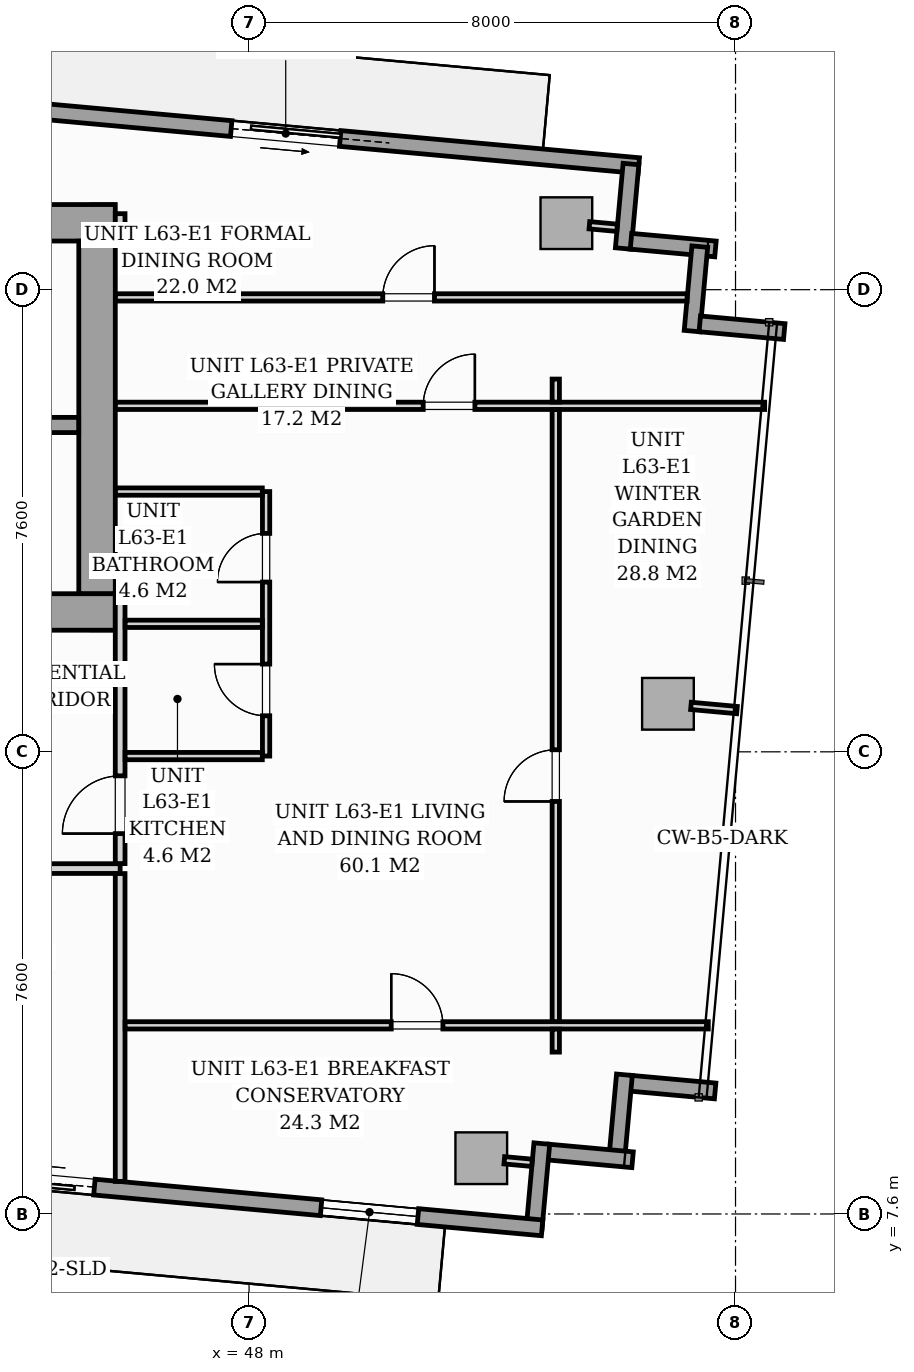
"""IFC4 building model, lengths in metres.
Left out: names, types, materials, properties, quantities, classifications, styles, units other than length and angle.
Written with IfcOpenShell. Run it as: python <this file> out.ifc"""

import sys

from ifc_helpers import new_model, si_unit, direction, frame, frame_2d, origin, origin_2d, place, context, subcontext, project, spatial, rectangle, i_section, extrude, source, transform, mapped, element, fill, save


model = new_model("IFC4")
c1 = context("Model", 3, precision=1e-05, world=origin(), true_north=direction((0.0, 1.0)))
c2 = subcontext(c1, "Body", "Model", "MODEL_VIEW")
j1 = project(units=[si_unit("LENGTHUNIT", "METRE"), si_unit("PLANEANGLEUNIT", "RADIAN")], contexts=[c1])
p1 = place(None, origin())
s1 = spatial("IfcSite", under=j1, at=p1, CompositionType="ELEMENT")
p2 = place(p1, origin())
s2 = spatial("IfcBuilding", under=s1, at=p2, CompositionType="ELEMENT")
p3 = place(p2, frame((0.0, 0.0, 219.9)))
s3 = spatial("IfcBuildingStorey", under=s2, at=p3, CompositionType="ELEMENT", Elevation=219.9)
m1 = source(origin(), c2, "Body", "SweptSolid", [
    extrude(i_section(OverallWidth=0.409, OverallDepth=0.425, WebThickness=0.033, FlangeThickness=0.052, FilletRadius=0.018, at=origin_2d()), origin(), (0.0, 0.0, 1.0), 3.296),
])
for number, where, z_axis, x_axis in (
    (1, (45.6, 17.4, 0.002), (0.0, 0.0, 1.0), (1.0, 0.0, 0.0)),
    (2, (45.6, 24.0, 0.002), (0.0, 0.0, 1.0), (1.0, 0.0, 0.0)),
):
    element("IfcColumn", number, at=place(p3, frame(where, z_axis=z_axis, x_axis=x_axis)), inside=s3, PredefinedType="PILASTER", context=c2, shape_type="MappedRepresentation", body=[
        mapped(m1, transform((0.0, 0.0, 0.0), scale=1.0)),
    ])
m2 = source(origin(), c2, "Body", "SweptSolid", [
    extrude(rectangle(XDim=0.85, YDim=0.85, at=origin_2d()), origin(), (0.0, 0.0, 1.0), 3.296),
])
for number, where, z_axis, x_axis in (
    (3, (51.819, 8.517, 0.002), (0.0, 0.0, 1.0), (0.996, -0.091, 0.0)),
    (4, (53.218, 23.894, 0.002), (0.0, 0.0, 1.0), (0.996, -0.091, 0.0)),
    (5, (54.889, 15.99, 0.002), (0.0, 0.0, 1.0), (0.996, -0.091, 0.0)),
):
    element("IfcColumn", number, at=place(p3, frame(where, z_axis=z_axis, x_axis=x_axis)), inside=s3, PredefinedType="COLUMN", context=c2, shape_type="MappedRepresentation", body=[
        mapped(m2, transform((0.0, 0.0, 0.0), scale=1.0)),
    ])
p4 = place(p3, frame((39.839, 26.166, 0.0), z_axis=(0.0, 0.0, 1.0), x_axis=(0.995884447498, -0.090632043071, 0.0)))
e6 = element("IfcWall", 6, at=p4, inside=s3, PredefinedType="STANDARD", context=c2, shape_type="SweptSolid", body=[
    extrude(rectangle(XDim=14.63, YDim=0.26, at=frame_2d((7.315, 0.0))), origin(), (0.0, 0.0, 1.0), 3.04),
])
p5 = place(p4, frame((7.9, 0.0, 0.0)))
e7 = element("IfcOpeningElement", 7, at=p5, cuts=e6, PredefinedType="OPENING", context=c2, shape_type="SweptSolid", body=[
    extrude(rectangle(XDim=1.8, YDim=2.06, at=frame_2d((0.9, 1.03))), frame((0.0, 0.14, 0.0), z_axis=(0.0, -1.0, 0.0), x_axis=(1.0, 0.0, 0.0)), (0.0, 0.0, 1.0), 0.28),
])
p6 = place(p4, frame((0.7, 0.0, 0.65)))
e8 = element("IfcOpeningElement", 8, at=p6, cuts=e6, PredefinedType="OPENING", context=c2, shape_type="SweptSolid", body=[
    extrude(rectangle(XDim=1.6, YDim=1.5, at=frame_2d((0.8, 0.75))), frame((0.0, 0.14, 0.0), z_axis=(0.0, -1.0, 0.0), x_axis=(1.0, 0.0, 0.0)), (0.0, 0.0, 1.0), 0.28),
])
p7 = place(p3, frame((54.281, 24.866, 0.0), z_axis=(0.0, 0.0, 1.0), x_axis=(-0.090661991521, -0.995881721538, 0.0)))
e9 = element("IfcWall", 9, at=p7, inside=s3, PredefinedType="STANDARD", context=c2, shape_type="SweptSolid", body=[
    extrude(rectangle(XDim=1.395, YDim=0.26, at=frame_2d((0.698, 0.0))), origin(), (0.0, 0.0, 1.0), 3.04),
])
for number, where, z_axis, x_axis in (
    (10, (54.281, 23.596, 0.0), (0.0, 0.0, 1.0), (0.996, -0.091, 0.0)),
    (11, (55.412, 23.508, 0.0), (0.0, 0.0, 1.0), (-0.091, -0.996, 0.0)),
    (12, (55.412, 22.238, 0.0), (0.0, 0.0, 1.0), (0.996, -0.091, 0.0)),
):
    element("IfcWall", number, at=place(p3, frame(where, z_axis=z_axis, x_axis=x_axis)), inside=s3, PredefinedType="STANDARD", context=c2, shape_type="SweptSolid", body=[
        extrude(rectangle(XDim=1.395, YDim=0.26, at=frame_2d((0.698, 0.0))), origin(), (0.0, 0.0, 1.0), 3.04),
    ])
for number, where, z_axis, x_axis in (
    (13, (55.665, 9.623, 0.0), (0.0, 0.0, 1.0), (-0.996, 0.091, 0.0)),
    (14, (54.173, 9.889, 0.0), (0.0, 0.0, 1.0), (-0.091, -0.996, 0.0)),
):
    element("IfcWall", number, at=place(p3, frame(where, z_axis=z_axis, x_axis=x_axis)), inside=s3, PredefinedType="STANDARD", context=c2, shape_type="SweptSolid", body=[
        extrude(rectangle(XDim=1.395, YDim=0.26, at=frame_2d((0.698, 0.0))), origin(), (0.0, 0.0, 1.0), 3.04),
    ])
for number, where, z_axis, x_axis in (
    (15, (54.307, 8.492, 0.0), (0.0, 0.0, 1.0), (-0.996, 0.091, 0.0)),
    (16, (52.815, 8.758, 0.0), (0.0, 0.0, 1.0), (-0.091, -0.996, 0.0)),
):
    element("IfcWall", number, at=place(p3, frame(where, z_axis=z_axis, x_axis=x_axis)), inside=s3, PredefinedType="STANDARD", context=c2, shape_type="SweptSolid", body=[
        extrude(rectangle(XDim=1.395, YDim=0.26, at=frame_2d((0.698, 0.0))), origin(), (0.0, 0.0, 1.0), 3.04),
    ])
p8 = place(p3, frame((52.819, 7.372, 0.0), z_axis=(0.0, 0.0, 1.0), x_axis=(-0.995884447498, 0.090632043071, 0.0)))
e17 = element("IfcWall", 17, at=p8, inside=s3, PredefinedType="STANDARD", context=c2, shape_type="SweptSolid", body=[
    extrude(rectangle(XDim=14.63, YDim=0.26, at=frame_2d((7.315, 0.0))), origin(), (0.0, 0.0, 1.0), 3.04),
])
p9 = place(p8, frame((7.393, 0.0, 0.0)))
e18 = element("IfcOpeningElement", 18, at=p9, cuts=e17, PredefinedType="OPENING", context=c2, shape_type="SweptSolid", body=[
    extrude(rectangle(XDim=1.8, YDim=2.06, at=frame_2d((0.9, 1.03))), frame((0.0, 0.14, 0.0), z_axis=(0.0, -1.0, 0.0), x_axis=(1.0, 0.0, 0.0)), (0.0, 0.0, 1.0), 0.28),
])
p10 = place(p8, frame((2.05, 0.0, 0.65)))
e19 = element("IfcOpeningElement", 19, at=p10, cuts=e17, PredefinedType="OPENING", context=c2, shape_type="SweptSolid", body=[
    extrude(rectangle(XDim=1.6, YDim=1.5, at=frame_2d((0.8, 0.75))), frame((0.0, 0.14, 0.0), z_axis=(0.0, -1.0, 0.0), x_axis=(1.0, 0.0, 0.0)), (0.0, 0.0, 1.0), 0.28),
])
p11 = place(p3, frame((26.2, 17.5, 0.0), z_axis=(0.0, 0.0, 1.0), x_axis=(1.0, 0.0, 0.0)))
e20 = element("IfcWall", 20, at=p11, inside=s3, PredefinedType="SHEAR", context=c2, shape_type="SweptSolid", body=[
    extrude(rectangle(XDim=19.6, YDim=0.6, at=frame_2d((9.8, 0.0))), origin(), (0.0, 0.0, 1.0), 3.3),
])
p12 = place(p11, frame((0.95, 0.0, 0.0)))
e21 = element("IfcOpeningElement", 21, at=p12, cuts=e20, PredefinedType="OPENING", context=c2, shape_type="SweptSolid", body=[
    extrude(rectangle(XDim=0.95, YDim=2.06, at=frame_2d((0.475, 1.03))), frame((0.0, 0.31, 0.0), z_axis=(0.0, -1.0, 0.0), x_axis=(1.0, 0.0, 0.0)), (0.0, 0.0, 1.0), 0.62),
])
p13 = place(p11, frame((9.38, 0.0, 0.0)))
e22 = element("IfcOpeningElement", 22, at=p13, cuts=e20, PredefinedType="OPENING", context=c2, shape_type="SweptSolid", body=[
    extrude(rectangle(XDim=0.85, YDim=2.0, at=frame_2d((0.425, 1.0))), frame((0.0, 0.31, 0.0), z_axis=(0.0, -1.0, 0.0), x_axis=(1.0, 0.0, 0.0)), (0.0, 0.0, 1.0), 0.62),
])
p14 = place(p11, frame((17.55, 0.0, 0.0)))
e23 = element("IfcOpeningElement", 23, at=p14, cuts=e20, PredefinedType="OPENING", context=c2, shape_type="SweptSolid", body=[
    extrude(rectangle(XDim=0.95, YDim=2.06, at=frame_2d((0.475, 1.03))), frame((0.0, 0.31, 0.0), z_axis=(0.0, -1.0, 0.0), x_axis=(1.0, 0.0, 0.0)), (0.0, 0.0, 1.0), 0.62),
])
p15 = place(p3, frame((26.2, 23.9, 0.0), z_axis=(0.0, 0.0, 1.0), x_axis=(1.0, 0.0, 0.0)))
e24 = element("IfcWall", 24, at=p15, inside=s3, PredefinedType="SHEAR", context=c2, shape_type="SweptSolid", body=[
    extrude(rectangle(XDim=19.6, YDim=0.6, at=frame_2d((9.8, 0.0))), origin(), (0.0, 0.0, 1.0), 3.3),
])
p16 = place(p3, frame((45.5, 17.802, 0.0), z_axis=(0.0, 0.0, 1.0), x_axis=(0.0, 1.0, 0.0)))
e25 = element("IfcWall", 25, at=p16, inside=s3, PredefinedType="SHEAR", context=c2, shape_type="SweptSolid", body=[
    extrude(rectangle(XDim=5.796, YDim=0.6, at=frame_2d((2.898, 0.0))), origin(), (0.0, 0.0, 1.0), 3.3),
])
p17 = place(p3, frame((37.05, 20.575, 0.0), z_axis=(0.0, 0.0, 1.0), x_axis=(1.0, 0.0, 0.0)))
e26 = element("IfcWall", 26, at=p17, inside=s3, PredefinedType="SOLIDWALL", context=c2, shape_type="SweptSolid", body=[
    extrude(rectangle(XDim=8.148, YDim=0.25, at=frame_2d((4.074, 0.0))), origin(), (0.0, 0.0, 1.0), 3.3),
])
p18 = place(p17, frame((6.6, 0.0, 0.0)))
e27 = element("IfcOpeningElement", 27, at=p18, cuts=e26, PredefinedType="OPENING", context=c2, shape_type="SweptSolid", body=[
    extrude(rectangle(XDim=0.95, YDim=2.06, at=frame_2d((0.475, 1.03))), frame((0.0, 0.135, 0.0), z_axis=(0.0, -1.0, 0.0), x_axis=(1.0, 0.0, 0.0)), (0.0, 0.0, 1.0), 0.27),
])
p19 = place(p3, frame((26.12, 13.28, 0.0), z_axis=(0.0, 0.0, 1.0), x_axis=(1.0, 0.0, 0.0)))
e28 = element("IfcWall", 28, at=p19, inside=s3, PredefinedType="PARTITIONING", context=c2, shape_type="SweptSolid", body=[
    extrude(rectangle(XDim=19.76, YDim=0.16, at=frame_2d((9.88, 0.0))), origin(), (0.0, 0.0, 1.0), 2.556),
])
p20 = place(p19, frame((5.345, 0.0, 0.0)))
e29 = element("IfcOpeningElement", 29, at=p20, cuts=e28, PredefinedType="OPENING", context=c2, shape_type="SweptSolid", body=[
    extrude(rectangle(XDim=0.95, YDim=2.06, at=frame_2d((0.475, 1.03))), frame((0.0, 0.09, 0.0), z_axis=(0.0, -1.0, 0.0), x_axis=(1.0, 0.0, 0.0)), (0.0, 0.0, 1.0), 0.18),
])
p21 = place(p19, frame((8.612, 0.0, 0.0)))
e30 = element("IfcOpeningElement", 30, at=p21, cuts=e28, PredefinedType="OPENING", context=c2, shape_type="SweptSolid", body=[
    extrude(rectangle(XDim=0.95, YDim=2.06, at=frame_2d((0.475, 1.03))), frame((0.0, 0.09, 0.0), z_axis=(0.0, -1.0, 0.0), x_axis=(1.0, 0.0, 0.0)), (0.0, 0.0, 1.0), 0.18),
])
p22 = place(p3, frame((45.88, 8.136, 0.0), z_axis=(0.0, 0.0, 1.0), x_axis=(0.0, 1.0, 0.0)))
e31 = element("IfcWall", 31, at=p22, inside=s3, PredefinedType="PARTITIONING", context=c2, shape_type="SweptSolid", body=[
    extrude(rectangle(XDim=5.062, YDim=0.16, at=frame_2d((2.531, 0.0))), origin(), (0.0, 0.0, 1.0), 3.04),
])
p23 = place(p3, frame((45.88, 13.362, 0.0), z_axis=(0.0, 0.0, 1.0), x_axis=(0.0, 1.0, 0.0)))
e32 = element("IfcWall", 32, at=p23, inside=s3, PredefinedType="PARTITIONING", context=c2, shape_type="SweptSolid", body=[
    extrude(rectangle(XDim=4.44, YDim=0.16, at=frame_2d((2.22, 0.0))), origin(), (0.0, 0.0, 1.0), 3.04),
])
p24 = place(p23, frame((0.493, 0.0, 0.0)))
e33 = element("IfcOpeningElement", 33, at=p24, cuts=e32, PredefinedType="OPENING", context=c2, shape_type="SweptSolid", body=[
    extrude(rectangle(XDim=0.95, YDim=2.06, at=frame_2d((0.475, 1.03))), frame((0.0, 0.09, 0.0), z_axis=(0.0, -1.0, 0.0), x_axis=(1.0, 0.0, 0.0)), (0.0, 0.0, 1.0), 0.18),
])
p25 = place(p3, frame((45.88, 23.598, 0.0), z_axis=(0.0, 0.0, 1.0), x_axis=(0.0, 1.0, 0.0)))
e34 = element("IfcWall", 34, at=p25, inside=s3, PredefinedType="PARTITIONING", context=c2, shape_type="SweptSolid", body=[
    extrude(rectangle(XDim=0.452, YDim=0.16, at=frame_2d((0.226, 0.0))), origin(), (0.0, 0.0, 1.0), 3.04),
])
p26 = place(p3, frame((48.28, 15.13, 0.0), z_axis=(0.0, 0.0, 1.0), x_axis=(0.0, 1.0, 0.0)))
e35 = element("IfcWall", 35, at=p26, inside=s3, PredefinedType="PARTITIONING", context=c2, shape_type="SweptSolid", body=[
    extrude(rectangle(XDim=4.35, YDim=0.12, at=frame_2d((2.175, 0.0))), origin(), (0.0, 0.0, 1.0), 3.04),
])
p27 = place(p26, frame((0.663, 0.0, 0.0)))
e36 = element("IfcOpeningElement", 36, at=p27, cuts=e35, PredefinedType="OPENING", context=c2, shape_type="SweptSolid", body=[
    extrude(rectangle(XDim=0.85, YDim=2.05, at=frame_2d((0.425, 1.025))), frame((0.0, 0.07, 0.0), z_axis=(0.0, -1.0, 0.0), x_axis=(1.0, 0.0, 0.0)), (0.0, 0.0, 1.0), 0.14),
])
p28 = place(p26, frame((2.862, 0.0, 0.0)))
e37 = element("IfcOpeningElement", 37, at=p28, cuts=e35, PredefinedType="OPENING", context=c2, shape_type="SweptSolid", body=[
    extrude(rectangle(XDim=0.8, YDim=2.02, at=frame_2d((0.4, 1.01))), frame((0.0, 0.07, 0.0), z_axis=(0.0, -1.0, 0.0), x_axis=(1.0, 0.0, 0.0)), (0.0, 0.0, 1.0), 0.14),
])
p29 = place(p3, frame((45.962, 17.305, 0.0), z_axis=(0.0, 0.0, 1.0), x_axis=(1.0, 0.0, 0.0)))
e38 = element("IfcWall", 38, at=p29, inside=s3, PredefinedType="PARTITIONING", context=c2, shape_type="SweptSolid", body=[
    extrude(rectangle(XDim=2.256, YDim=0.12, at=frame_2d((1.128, 0.0))), origin(), (0.0, 0.0, 1.0), 2.382),
])
p30 = place(p3, frame((45.962, 15.13, 0.0), z_axis=(0.0, 0.0, 1.0), x_axis=(1.0, 0.0, 0.0)))
e39 = element("IfcWall", 39, at=p30, inside=s3, PredefinedType="PARTITIONING", context=c2, shape_type="SweptSolid", body=[
    extrude(rectangle(XDim=2.256, YDim=0.12, at=frame_2d((1.128, 0.0))), origin(), (0.0, 0.0, 1.0), 3.04),
])
p31 = place(p3, frame((45.802, 19.48, 0.0), z_axis=(0.0, 0.0, 1.0), x_axis=(1.0, 0.0, 0.0)))
e40 = element("IfcWall", 40, at=p31, inside=s3, PredefinedType="PARTITIONING", context=c2, shape_type="SweptSolid", body=[
    extrude(rectangle(XDim=2.416, YDim=0.12, at=frame_2d((1.208, 0.0))), origin(), (0.0, 0.0, 1.0), 3.04),
])
p32 = place(p3, frame((45.802, 22.673, 0.0), z_axis=(0.0, 0.0, 1.0), x_axis=(1.0, 0.0, 0.0)))
e41 = element("IfcWall", 41, at=p32, inside=s3, PredefinedType="PARTITIONING", context=c2, shape_type="SweptSolid", body=[
    extrude(rectangle(XDim=9.402, YDim=0.12, at=frame_2d((4.701, 0.0))), origin(), (0.0, 0.0, 1.0), 3.04),
])
p33 = place(p32, frame((4.397, 0.0, 0.0)))
e42 = element("IfcOpeningElement", 42, at=p33, cuts=e41, PredefinedType="OPENING", context=c2, shape_type="SweptSolid", body=[
    extrude(rectangle(XDim=0.85, YDim=2.05, at=frame_2d((0.425, 1.025))), frame((0.0, 0.07, 0.0), z_axis=(0.0, -1.0, 0.0), x_axis=(1.0, 0.0, 0.0)), (0.0, 0.0, 1.0), 0.14),
])
p34 = place(p3, frame((45.962, 10.702, 0.0), z_axis=(0.0, 0.0, 1.0), x_axis=(1.0, 0.0, 0.0)))
e43 = element("IfcWall", 43, at=p34, inside=s3, PredefinedType="PARTITIONING", context=c2, shape_type="SweptSolid", body=[
    extrude(rectangle(XDim=9.59, YDim=0.12, at=frame_2d((4.795, 0.0))), origin(), (0.0, 0.0, 1.0), 3.04),
])
p35 = place(p34, frame((4.376, 0.0, 0.0)))
e44 = element("IfcOpeningElement", 44, at=p35, cuts=e43, PredefinedType="OPENING", context=c2, shape_type="SweptSolid", body=[
    extrude(rectangle(XDim=0.85, YDim=2.05, at=frame_2d((0.425, 1.025))), frame((0.0, 0.07, 0.0), z_axis=(0.0, -1.0, 0.0), x_axis=(1.0, 0.0, 0.0)), (0.0, 0.0, 1.0), 0.14),
])
p36 = place(p3, frame((45.802, 20.89, 0.0), z_axis=(0.0, 0.0, 1.0), x_axis=(1.0, 0.0, 0.0)))
e45 = element("IfcWall", 45, at=p36, inside=s3, PredefinedType="PARTITIONING", context=c2, shape_type="SweptSolid", body=[
    extrude(rectangle(XDim=10.677, YDim=0.12, at=frame_2d((5.339, 0.0))), origin(), (0.0, 0.0, 1.0), 3.04),
])
p37 = place(p36, frame((5.062, 0.0, 0.0)))
e46 = element("IfcOpeningElement", 46, at=p37, cuts=e45, PredefinedType="OPENING", context=c2, shape_type="SweptSolid", body=[
    extrude(rectangle(XDim=0.85, YDim=2.05, at=frame_2d((0.425, 1.025))), frame((0.0, 0.07, 0.0), z_axis=(0.0, -1.0, 0.0), x_axis=(1.0, 0.0, 0.0)), (0.0, 0.0, 1.0), 0.14),
])
p38 = place(p3, frame((53.044, 10.262, 0.0), z_axis=(0.0, 0.0, 1.0), x_axis=(0.0, 1.0, 0.0)))
e47 = element("IfcWall", 47, at=p38, inside=s3, PredefinedType="PARTITIONING", context=c2, shape_type="SweptSolid", body=[
    extrude(rectangle(XDim=0.378, YDim=0.12, at=frame_2d((0.189, 0.0))), origin(), (0.0, 0.0, 1.0), 3.04),
])
p39 = place(p3, frame((53.044, 10.764, 0.0), z_axis=(0.0, 0.0, 1.0), x_axis=(0.0, 1.0, 0.0)))
e48 = element("IfcWall", 48, at=p39, inside=s3, PredefinedType="PARTITIONING", context=c2, shape_type="SweptSolid", body=[
    extrude(rectangle(XDim=10.064, YDim=0.12, at=frame_2d((5.032, 0.0))), origin(), (0.0, 0.0, 1.0), 3.04),
])
p40 = place(p39, frame((3.62, 0.0, 0.0)))
e49 = element("IfcOpeningElement", 49, at=p40, cuts=e48, PredefinedType="OPENING", context=c2, shape_type="SweptSolid", body=[
    extrude(rectangle(XDim=0.85, YDim=2.05, at=frame_2d((0.425, 1.025))), frame((0.0, 0.07, 0.0), z_axis=(0.0, -1.0, 0.0), x_axis=(1.0, 0.0, 0.0)), (0.0, 0.0, 1.0), 0.14),
])
p41 = place(p3, frame((53.044, 20.952, 0.0), z_axis=(0.0, 0.0, 1.0), x_axis=(0.0, 1.0, 0.0)))
e50 = element("IfcWall", 50, at=p41, inside=s3, PredefinedType="PARTITIONING", context=c2, shape_type="SweptSolid", body=[
    extrude(rectangle(XDim=0.378, YDim=0.12, at=frame_2d((0.189, 0.0))), origin(), (0.0, 0.0, 1.0), 3.04),
])
for number, where, z_axis, x_axis in (
    (51, (52.197, 8.483, 0.0), (0.0, 0.0, 1.0), (0.996, -0.091, 0.0)),
    (52, (53.597, 23.859, 0.0), (0.0, 0.0, 1.0), (0.996, -0.091, 0.0)),
):
    element("IfcWall", number, at=place(p3, frame(where, z_axis=z_axis, x_axis=x_axis)), inside=s3, PredefinedType="PARTITIONING", context=c2, shape_type="SweptSolid", body=[
        extrude(rectangle(XDim=0.458, YDim=0.12, at=frame_2d((0.229, 0.0))), origin(), (0.0, 0.0, 1.0), 3.04),
    ])
p42 = place(p3, frame((55.267, 15.955, 0.0), z_axis=(0.0, 0.0, 1.0), x_axis=(0.995887938321, -0.09059367697, 0.0)))
e53 = element("IfcWall", 53, at=p42, inside=s3, PredefinedType="PARTITIONING", context=c2, shape_type="SweptSolid", body=[
    extrude(rectangle(XDim=0.76, YDim=0.12, at=frame_2d((0.38, 0.0))), origin(), (0.0, 0.0, 1.0), 3.04),
])
m3 = source(origin(), c2, "Body", "SweptSolid", [
    extrude(rectangle(XDim=1.8, YDim=2.06, at=frame_2d((0.9, 1.03))), frame((0.0, 0.025, 0.0), z_axis=(0.0, -1.0, 0.0), x_axis=(1.0, 0.0, 0.0)), (0.0, 0.0, 1.0), 0.05),
])
p43 = place(p5, origin())
e54 = element("IfcDoor", 54, at=p43, inside=s3, OperationType="SLIDING_TO_RIGHT", PredefinedType="DOOR", context=c2, shape_type="MappedRepresentation", body=[
    mapped(m3, transform((0.0, 0.0, 0.0), scale=1.0)),
])
fill(e7, e54)
p44 = place(p9, origin())
e55 = element("IfcDoor", 55, at=p44, inside=s3, OperationType="SLIDING_TO_RIGHT", PredefinedType="DOOR", context=c2, shape_type="MappedRepresentation", body=[
    mapped(m3, transform((0.0, 0.0, 0.0), scale=1.0)),
])
fill(e18, e55)
m4 = source(origin(), c2, "Body", "SweptSolid", [
    extrude(rectangle(XDim=1.6, YDim=1.5, at=frame_2d((0.8, 0.75))), frame((0.0, 0.03, 0.0), z_axis=(0.0, -1.0, 0.0), x_axis=(1.0, 0.0, 0.0)), (0.0, 0.0, 1.0), 0.06),
])
p45 = place(p10, origin())
e56 = element("IfcWindow", 56, at=p45, inside=s3, PartitioningType="SINGLE_PANEL", PredefinedType="WINDOW", context=c2, shape_type="MappedRepresentation", body=[
    mapped(m4, transform((0.0, 0.0, 0.0), scale=1.0)),
])
fill(e19, e56)
m5 = source(origin(), c2, "Body", "SweptSolid", [
    extrude(rectangle(XDim=0.95, YDim=2.06, at=frame_2d((0.475, 1.03))), frame((0.0, 0.025, 0.0), z_axis=(0.0, -1.0, 0.0), x_axis=(1.0, 0.0, 0.0)), (0.0, 0.0, 1.0), 0.05),
])
p46 = place(p24, origin())
e57 = element("IfcDoor", 57, at=p46, inside=s3, OperationType="SINGLE_SWING_LEFT", PredefinedType="DOOR", context=c2, shape_type="MappedRepresentation", body=[
    mapped(m5, transform((0.0, 0.0, 0.0), scale=1.0)),
])
fill(e33, e57)
m6 = source(origin(), c2, "Body", "SweptSolid", [
    extrude(rectangle(XDim=0.85, YDim=2.05, at=frame_2d((0.425, 1.025))), frame((0.0, 0.025, 0.0), z_axis=(0.0, -1.0, 0.0), x_axis=(1.0, 0.0, 0.0)), (0.0, 0.0, 1.0), 0.05),
])
p47 = place(p27, origin())
e58 = element("IfcDoor", 58, at=p47, inside=s3, OperationType="SINGLE_SWING_RIGHT", PredefinedType="DOOR", context=c2, shape_type="MappedRepresentation", body=[
    mapped(m6, transform((0.0, 0.0, 0.0), scale=1.0)),
])
fill(e36, e58)
m7 = source(origin(), c2, "Body", "SweptSolid", [
    extrude(rectangle(XDim=0.8, YDim=2.02, at=frame_2d((0.4, 1.01))), frame((0.0, 0.025, 0.0), z_axis=(0.0, -1.0, 0.0), x_axis=(1.0, 0.0, 0.0)), (0.0, 0.0, 1.0), 0.05),
])
p48 = place(p28, origin())
e59 = element("IfcDoor", 59, at=p48, inside=s3, OperationType="SINGLE_SWING_LEFT", PredefinedType="DOOR", context=c2, shape_type="MappedRepresentation", body=[
    mapped(m7, transform((0.0, 0.0, 0.0), scale=1.0)),
])
fill(e37, e59)
p49 = place(p33, origin())
e60 = element("IfcDoor", 60, at=p49, inside=s3, OperationType="SINGLE_SWING_RIGHT", PredefinedType="DOOR", context=c2, shape_type="MappedRepresentation", body=[
    mapped(m6, transform((0.0, 0.0, 0.0), scale=1.0)),
])
fill(e42, e60)
p50 = place(p35, origin())
e61 = element("IfcDoor", 61, at=p50, inside=s3, OperationType="SINGLE_SWING_LEFT", PredefinedType="DOOR", context=c2, shape_type="MappedRepresentation", body=[
    mapped(m6, transform((0.0, 0.0, 0.0), scale=1.0)),
])
fill(e44, e61)
p51 = place(p37, origin())
e62 = element("IfcDoor", 62, at=p51, inside=s3, OperationType="SINGLE_SWING_RIGHT", PredefinedType="DOOR", context=c2, shape_type="MappedRepresentation", body=[
    mapped(m6, transform((0.0, 0.0, 0.0), scale=1.0)),
])
fill(e46, e62)
p52 = place(p40, origin())
e63 = element("IfcDoor", 63, at=p52, inside=s3, OperationType="SINGLE_SWING_LEFT", PredefinedType="DOOR", context=c2, shape_type="MappedRepresentation", body=[
    mapped(m6, transform((0.0, 0.0, 0.0), scale=1.0)),
])
fill(e49, e63)
save(model, sys.argv[1])
